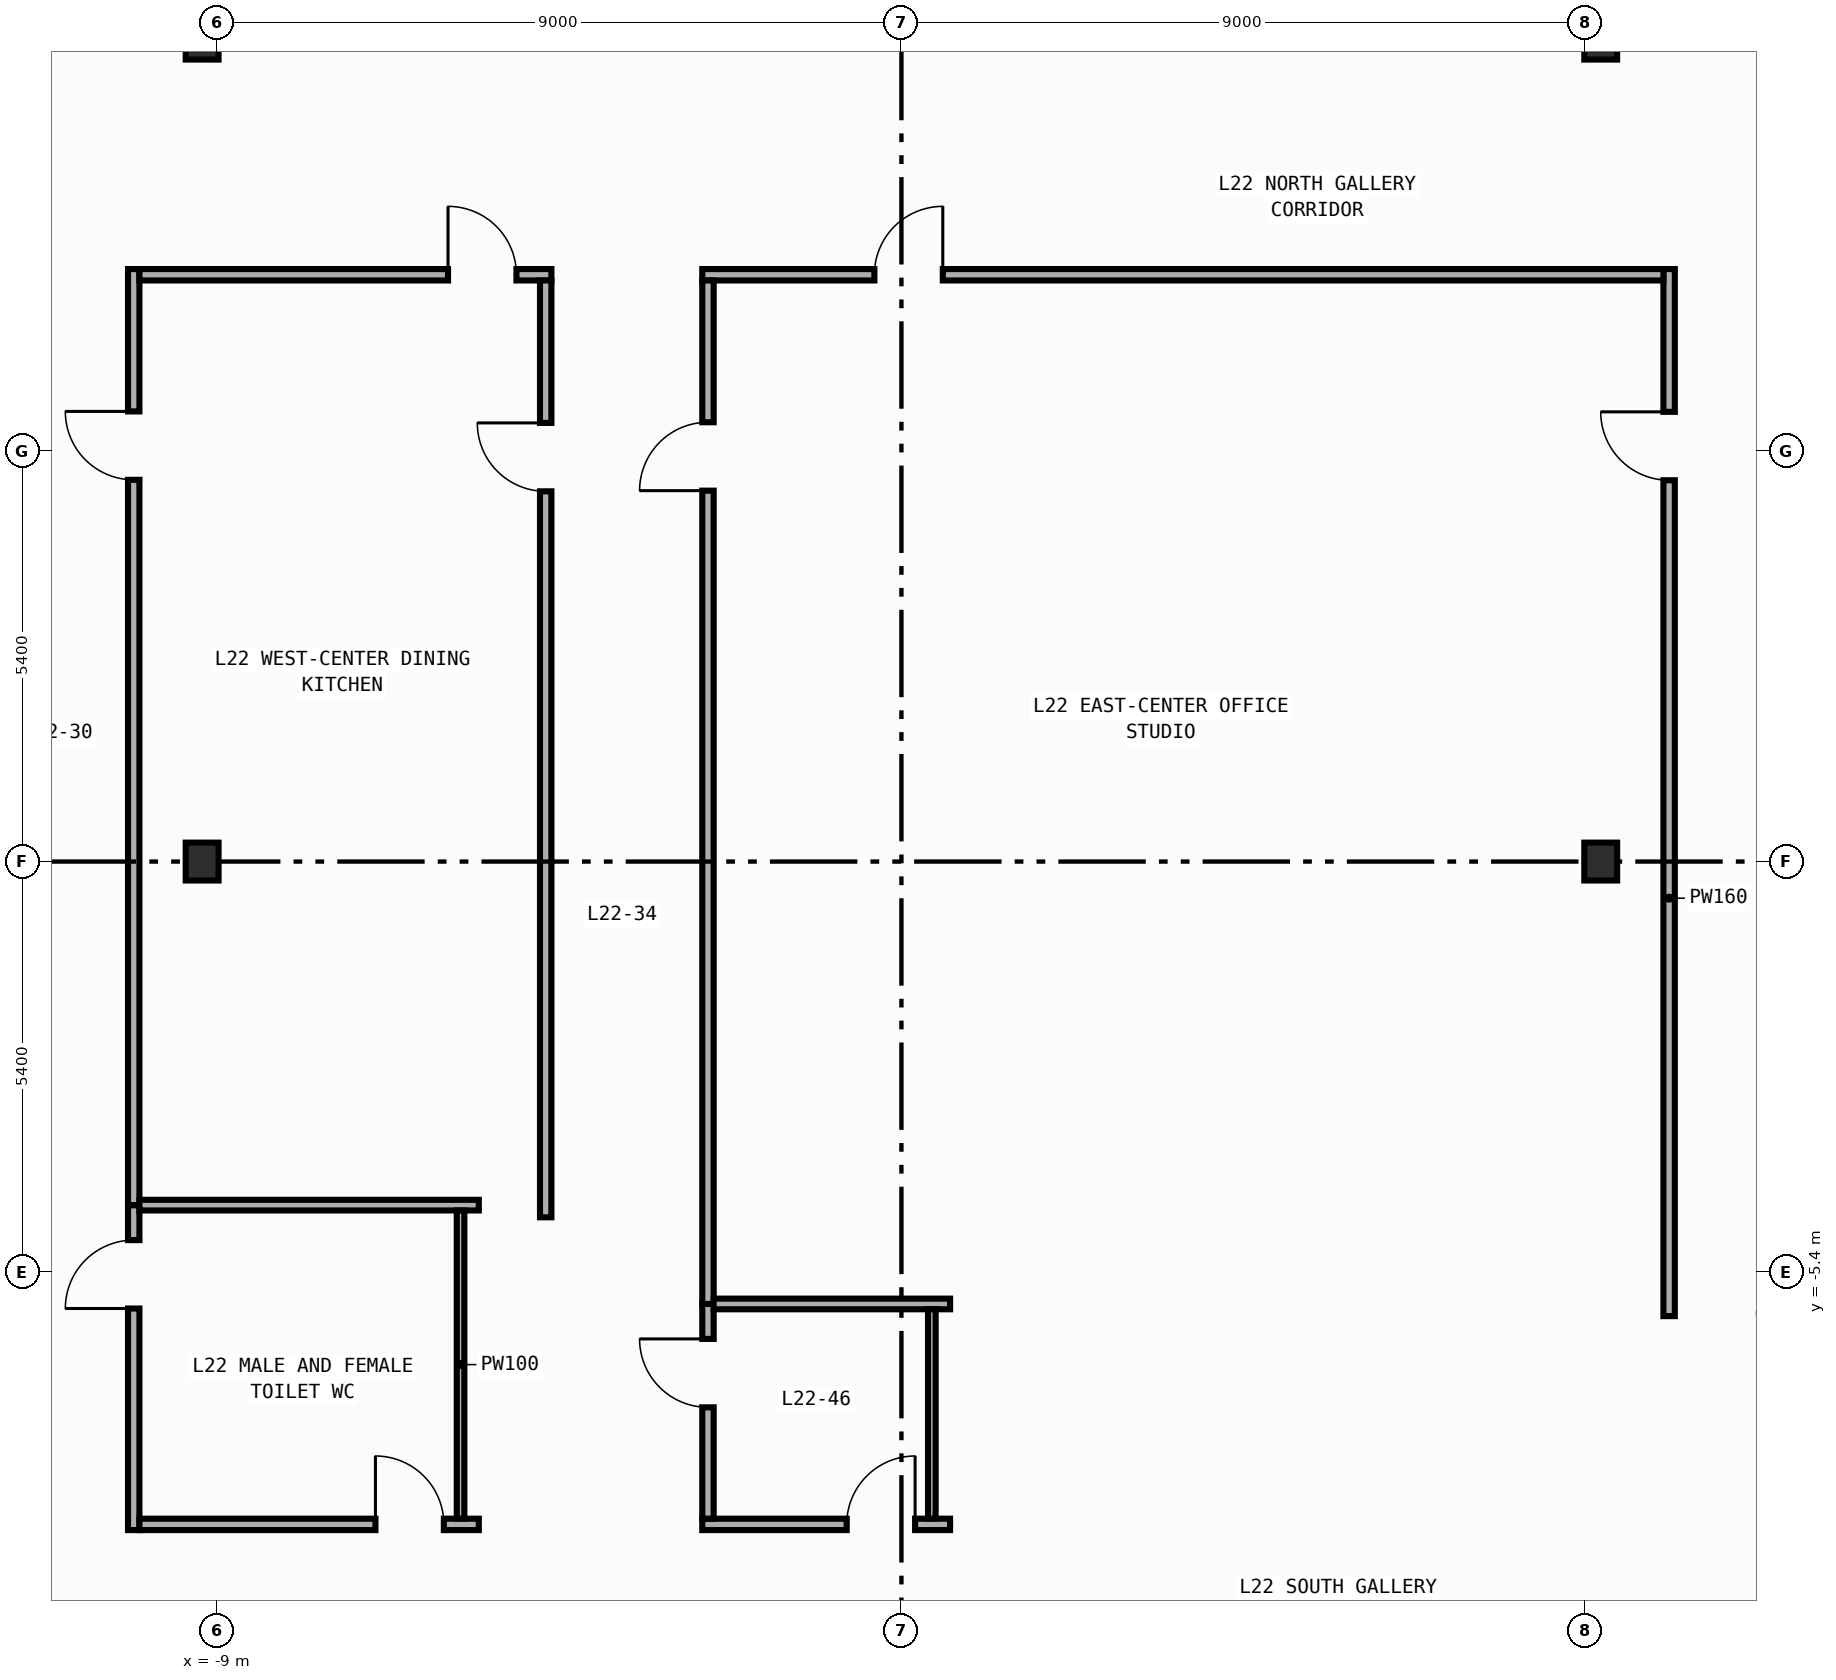
"""IFC4 building model, lengths in metres.
Left out: names, types, materials, properties, quantities, classifications, styles, units other than length and angle.
Written with IfcOpenShell. Run it as: python <this file> out.ifc"""

import sys

from ifc_helpers import new_model, si_unit, direction, frame, frame_2d, origin, origin_2d, place, context, subcontext, project, spatial, rectangle, i_section, extrude, element, fill, save


model = new_model("IFC4")
c1 = context("Model", 3, precision=1e-05, world=origin(), true_north=direction((0.0, 1.0)))
c2 = subcontext(c1, "Body", "Model", "MODEL_VIEW")
j1 = project(units=[si_unit("LENGTHUNIT", "METRE"), si_unit("PLANEANGLEUNIT", "RADIAN")], contexts=[c1])
p1 = place(None, origin())
s1 = spatial("IfcSite", under=j1, at=p1, CompositionType="ELEMENT")
p2 = place(p1, origin())
s2 = spatial("IfcBuilding", under=s1, at=p2, CompositionType="ELEMENT")
p3 = place(p2, frame((0.0, 0.0, 97.4)))
s3 = spatial("IfcBuildingStorey", under=s2, at=p3, CompositionType="ELEMENT", Elevation=97.4)
for number, where, z_axis, x_axis in (
    (1, (-9.2, 0.0, 0.0), (0.0, 0.0, 1.0), (1.0, 0.0, 0.0)),
    (2, (-9.2, 10.8, 0.0), (0.0, 0.0, 1.0), (1.0, 0.0, 0.0)),
    (3, (9.2, 0.0, 0.0), (0.0, 0.0, 1.0), (1.0, 0.0, 0.0)),
    (4, (9.2, 10.8, 0.0), (0.0, 0.0, 1.0), (1.0, 0.0, 0.0)),
):
    element("IfcColumn", number, at=place(p3, frame(where, z_axis=z_axis, x_axis=x_axis)), inside=s3, PredefinedType="COLUMN", context=c2, shape_type="SweptSolid", body=[
        extrude(i_section(OverallWidth=0.432, OverallDepth=0.498, WebThickness=0.045, FlangeThickness=0.07, FilletRadius=0.022, at=origin_2d()), origin(), (0.0, 0.0, 1.0), 4.2),
    ])
p4 = place(p3, frame((-10.1, -8.795, 0.0), z_axis=(0.0, 0.0, 1.0), x_axis=(0.0, 1.0, 0.0)))
e5 = element("IfcWall", 5, at=p4, inside=s3, PredefinedType="PARTITIONING", context=c2, shape_type="SweptSolid", body=[
    extrude(rectangle(XDim=4.275, YDim=0.15, at=frame_2d((2.137, 0.0))), origin(), (0.0, 0.0, 1.0), 3.94),
])
p5 = place(p4, frame((2.915, 0.0, 0.0)))
e6 = element("IfcOpeningElement", 6, at=p5, cuts=e5, PredefinedType="OPENING", context=c2, shape_type="SweptSolid", body=[
    extrude(rectangle(XDim=0.9, YDim=2.15, at=frame_2d((0.45, 1.075))), frame((0.0, 0.085, 0.0), z_axis=(0.0, -1.0, 0.0), x_axis=(1.0, 0.0, 0.0)), (0.0, 0.0, 1.0), 0.17),
])
p6 = place(p3, frame((-10.1, -4.52, 0.0), z_axis=(0.0, 0.0, 1.0), x_axis=(0.0, 1.0, 0.0)))
e7 = element("IfcWall", 7, at=p6, inside=s3, PredefinedType="PARTITIONING", context=c2, shape_type="SweptSolid", body=[
    extrude(rectangle(XDim=12.315, YDim=0.15, at=frame_2d((6.157, 0.0))), origin(), (0.0, 0.0, 1.0), 3.94),
])
p7 = place(p6, frame((9.542, 0.0, 0.0)))
e8 = element("IfcOpeningElement", 8, at=p7, cuts=e7, PredefinedType="OPENING", context=c2, shape_type="SweptSolid", body=[
    extrude(rectangle(XDim=0.9, YDim=2.15, at=frame_2d((0.45, 1.075))), frame((0.0, 0.085, 0.0), z_axis=(0.0, -1.0, 0.0), x_axis=(1.0, 0.0, 0.0)), (0.0, 0.0, 1.0), 0.17),
])
p8 = place(p3, frame((10.1, -5.98, 0.0), z_axis=(0.0, 0.0, 1.0), x_axis=(0.0, 1.0, 0.0)))
e9 = element("IfcWall", 9, at=p8, inside=s3, PredefinedType="PARTITIONING", context=c2, shape_type="SweptSolid", body=[
    extrude(rectangle(XDim=13.775, YDim=0.15, at=frame_2d((6.887, 0.0))), origin(), (0.0, 0.0, 1.0), 3.94),
])
p9 = place(p8, frame((10.997, 0.0, 0.0)))
e10 = element("IfcOpeningElement", 10, at=p9, cuts=e9, PredefinedType="OPENING", context=c2, shape_type="SweptSolid", body=[
    extrude(rectangle(XDim=0.9, YDim=2.15, at=frame_2d((0.45, 1.075))), frame((0.0, 0.085, 0.0), z_axis=(0.0, -1.0, 0.0), x_axis=(1.0, 0.0, 0.0)), (0.0, 0.0, 1.0), 0.17),
])
p10 = place(p3, frame((-2.62, 7.72, 0.0), z_axis=(0.0, 0.0, 1.0), x_axis=(1.0, 0.0, 0.0)))
e11 = element("IfcWall", 11, at=p10, inside=s3, PredefinedType="PARTITIONING", context=c2, shape_type="SweptSolid", body=[
    extrude(rectangle(XDim=12.645, YDim=0.15, at=frame_2d((6.323, 0.0))), origin(), (0.0, 0.0, 1.0), 3.94),
])
p11 = place(p10, frame((2.264, 0.0, 0.0)))
e12 = element("IfcOpeningElement", 12, at=p11, cuts=e11, PredefinedType="OPENING", context=c2, shape_type="SweptSolid", body=[
    extrude(rectangle(XDim=0.9, YDim=2.15, at=frame_2d((0.45, 1.075))), frame((0.0, 0.085, 0.0), z_axis=(0.0, -1.0, 0.0), x_axis=(1.0, 0.0, 0.0)), (0.0, 0.0, 1.0), 0.17),
])
p12 = place(p3, frame((-10.025, 7.72, 0.0), z_axis=(0.0, 0.0, 1.0), x_axis=(1.0, 0.0, 0.0)))
e13 = element("IfcWall", 13, at=p12, inside=s3, PredefinedType="PARTITIONING", context=c2, shape_type="SweptSolid", body=[
    extrude(rectangle(XDim=5.42, YDim=0.15, at=frame_2d((2.71, 0.0))), origin(), (0.0, 0.0, 1.0), 3.94),
])
p13 = place(p12, frame((4.06, 0.0, 0.0)))
e14 = element("IfcOpeningElement", 14, at=p13, cuts=e13, PredefinedType="OPENING", context=c2, shape_type="SweptSolid", body=[
    extrude(rectangle(XDim=0.9, YDim=2.15, at=frame_2d((0.45, 1.075))), frame((0.0, 0.085, 0.0), z_axis=(0.0, -1.0, 0.0), x_axis=(1.0, 0.0, 0.0)), (0.0, 0.0, 1.0), 0.17),
])
p14 = place(p3, frame((-2.62, -8.72, 0.0), z_axis=(0.0, 0.0, 1.0), x_axis=(1.0, 0.0, 0.0)))
e15 = element("IfcWall", 15, at=p14, inside=s3, PredefinedType="PARTITIONING", context=c2, shape_type="SweptSolid", body=[
    extrude(rectangle(XDim=3.26, YDim=0.15, at=frame_2d((1.63, 0.0))), origin(), (0.0, 0.0, 1.0), 3.94),
])
p15 = place(p14, frame((1.9, 0.0, 0.0)))
e16 = element("IfcOpeningElement", 16, at=p15, cuts=e15, PredefinedType="OPENING", context=c2, shape_type="SweptSolid", body=[
    extrude(rectangle(XDim=0.9, YDim=2.15, at=frame_2d((0.45, 1.075))), frame((0.0, 0.085, 0.0), z_axis=(0.0, -1.0, 0.0), x_axis=(1.0, 0.0, 0.0)), (0.0, 0.0, 1.0), 0.17),
])
p16 = place(p3, frame((-10.025, -8.72, 0.0), z_axis=(0.0, 0.0, 1.0), x_axis=(1.0, 0.0, 0.0)))
e17 = element("IfcWall", 17, at=p16, inside=s3, PredefinedType="PARTITIONING", context=c2, shape_type="SweptSolid", body=[
    extrude(rectangle(XDim=4.465, YDim=0.15, at=frame_2d((2.232, 0.0))), origin(), (0.0, 0.0, 1.0), 3.94),
])
p17 = place(p16, frame((3.105, 0.0, 0.0)))
e18 = element("IfcOpeningElement", 18, at=p17, cuts=e17, PredefinedType="OPENING", context=c2, shape_type="SweptSolid", body=[
    extrude(rectangle(XDim=0.9, YDim=2.15, at=frame_2d((0.45, 1.075))), frame((0.0, 0.085, 0.0), z_axis=(0.0, -1.0, 0.0), x_axis=(1.0, 0.0, 0.0)), (0.0, 0.0, 1.0), 0.17),
])
p18 = place(p3, frame((-2.545, -8.645, 0.0), z_axis=(0.0, 0.0, 1.0), x_axis=(0.0, 1.0, 0.0)))
e19 = element("IfcWall", 19, at=p18, inside=s3, PredefinedType="PARTITIONING", context=c2, shape_type="SweptSolid", body=[
    extrude(rectangle(XDim=2.825, YDim=0.15, at=frame_2d((1.413, 0.0))), origin(), (0.0, 0.0, 1.0), 3.94),
])
p19 = place(p18, frame((1.465, 0.0, 0.0)))
e20 = element("IfcOpeningElement", 20, at=p19, cuts=e19, PredefinedType="OPENING", context=c2, shape_type="SweptSolid", body=[
    extrude(rectangle(XDim=0.9, YDim=2.15, at=frame_2d((0.45, 1.075))), frame((0.0, 0.085, 0.0), z_axis=(0.0, -1.0, 0.0), x_axis=(1.0, 0.0, 0.0)), (0.0, 0.0, 1.0), 0.17),
])
p20 = place(p3, frame((-2.545, -5.82, 0.0), z_axis=(0.0, 0.0, 1.0), x_axis=(0.0, 1.0, 0.0)))
e21 = element("IfcWall", 21, at=p20, inside=s3, PredefinedType="PARTITIONING", context=c2, shape_type="SweptSolid", body=[
    extrude(rectangle(XDim=13.465, YDim=0.15, at=frame_2d((6.732, 0.0))), origin(), (0.0, 0.0, 1.0), 3.94),
])
p21 = place(p20, frame((10.7, 0.0, 0.0)))
e22 = element("IfcOpeningElement", 22, at=p21, cuts=e21, PredefinedType="OPENING", context=c2, shape_type="SweptSolid", body=[
    extrude(rectangle(XDim=0.9, YDim=2.15, at=frame_2d((0.45, 1.075))), frame((0.0, 0.085, 0.0), z_axis=(0.0, -1.0, 0.0), x_axis=(1.0, 0.0, 0.0)), (0.0, 0.0, 1.0), 0.17),
])
p22 = place(p3, frame((-4.68, -4.68, 0.0), z_axis=(0.0, 0.0, 1.0), x_axis=(0.0, 1.0, 0.0)))
e23 = element("IfcWall", 23, at=p22, inside=s3, PredefinedType="PARTITIONING", context=c2, shape_type="SweptSolid", body=[
    extrude(rectangle(XDim=12.325, YDim=0.15, at=frame_2d((6.163, 0.0))), origin(), (0.0, 0.0, 1.0), 3.49),
])
p23 = place(p22, frame((9.551, 0.0, 0.0)))
e24 = element("IfcOpeningElement", 24, at=p23, cuts=e23, PredefinedType="OPENING", context=c2, shape_type="SweptSolid", body=[
    extrude(rectangle(XDim=0.9, YDim=2.15, at=frame_2d((0.45, 1.075))), frame((0.0, 0.085, 0.0), z_axis=(0.0, -1.0, 0.0), x_axis=(1.0, 0.0, 0.0)), (0.0, 0.0, 1.0), 0.17),
])
p24 = place(p3, frame((-2.47, -5.82, 0.0), z_axis=(0.0, 0.0, 1.0), x_axis=(1.0, 0.0, 0.0)))
e25 = element("IfcWall", 25, at=p24, inside=s3, PredefinedType="PARTITIONING", context=c2, shape_type="SweptSolid", body=[
    extrude(rectangle(XDim=3.11, YDim=0.14, at=frame_2d((1.555, 0.0))), origin(), (0.0, 0.0, 1.0), 3.94),
])
p25 = place(p3, frame((-10.025, -4.52, 0.0), z_axis=(0.0, 0.0, 1.0), x_axis=(1.0, 0.0, 0.0)))
e26 = element("IfcWall", 26, at=p25, inside=s3, PredefinedType="PARTITIONING", context=c2, shape_type="SweptSolid", body=[
    extrude(rectangle(XDim=4.465, YDim=0.14, at=frame_2d((2.232, 0.0))), origin(), (0.0, 0.0, 1.0), 3.94),
])
p26 = place(p3, frame((0.4, -5.89, 0.0), z_axis=(0.0, 0.0, 1.0), x_axis=(0.0, -1.0, 0.0)))
e27 = element("IfcWall", 27, at=p26, inside=s3, PredefinedType="PARTITIONING", context=c2, shape_type="SweptSolid", body=[
    extrude(rectangle(XDim=2.755, YDim=0.1, at=frame_2d((1.377, 0.0))), origin(), (0.0, 0.0, 1.0), 3.94),
])
p27 = place(p3, frame((-5.8, -4.59, 0.0), z_axis=(0.0, 0.0, 1.0), x_axis=(0.0, -1.0, 0.0)))
e28 = element("IfcWall", 28, at=p27, inside=s3, PredefinedType="PARTITIONING", context=c2, shape_type="SweptSolid", body=[
    extrude(rectangle(XDim=4.055, YDim=0.1, at=frame_2d((2.027, 0.0))), origin(), (0.0, 0.0, 1.0), 3.94),
])
p28 = place(p5, origin())
e29 = element("IfcDoor", 29, at=p28, inside=s3, OperationType="SINGLE_SWING_LEFT", PredefinedType="DOOR", context=c2, shape_type="SweptSolid", body=[
    extrude(rectangle(XDim=0.9, YDim=2.15, at=frame_2d((0.45, 1.075))), frame((0.0, 0.025, 0.0), z_axis=(0.0, -1.0, 0.0), x_axis=(1.0, 0.0, 0.0)), (0.0, 0.0, 1.0), 0.05),
])
fill(e6, e29)
p29 = place(p7, origin())
e30 = element("IfcDoor", 30, at=p29, inside=s3, OperationType="SINGLE_SWING_RIGHT", PredefinedType="DOOR", context=c2, shape_type="SweptSolid", body=[
    extrude(rectangle(XDim=0.9, YDim=2.15, at=frame_2d((0.45, 1.075))), frame((0.0, 0.025, 0.0), z_axis=(0.0, -1.0, 0.0), x_axis=(1.0, 0.0, 0.0)), (0.0, 0.0, 1.0), 0.05),
])
fill(e8, e30)
p30 = place(p9, origin())
e31 = element("IfcDoor", 31, at=p30, inside=s3, OperationType="SINGLE_SWING_RIGHT", PredefinedType="DOOR", context=c2, shape_type="SweptSolid", body=[
    extrude(rectangle(XDim=0.9, YDim=2.15, at=frame_2d((0.45, 1.075))), frame((0.0, 0.025, 0.0), z_axis=(0.0, -1.0, 0.0), x_axis=(1.0, 0.0, 0.0)), (0.0, 0.0, 1.0), 0.05),
])
fill(e10, e31)
p31 = place(p11, origin())
e32 = element("IfcDoor", 32, at=p31, inside=s3, OperationType="SINGLE_SWING_RIGHT", PredefinedType="DOOR", context=c2, shape_type="SweptSolid", body=[
    extrude(rectangle(XDim=0.9, YDim=2.15, at=frame_2d((0.45, 1.075))), frame((0.0, 0.025, 0.0), z_axis=(0.0, -1.0, 0.0), x_axis=(1.0, 0.0, 0.0)), (0.0, 0.0, 1.0), 0.05),
])
fill(e12, e32)
p32 = place(p13, origin())
e33 = element("IfcDoor", 33, at=p32, inside=s3, OperationType="SINGLE_SWING_LEFT", PredefinedType="DOOR", context=c2, shape_type="SweptSolid", body=[
    extrude(rectangle(XDim=0.9, YDim=2.15, at=frame_2d((0.45, 1.075))), frame((0.0, 0.025, 0.0), z_axis=(0.0, -1.0, 0.0), x_axis=(1.0, 0.0, 0.0)), (0.0, 0.0, 1.0), 0.05),
])
fill(e14, e33)
p33 = place(p15, origin())
e34 = element("IfcDoor", 34, at=p33, inside=s3, OperationType="SINGLE_SWING_RIGHT", PredefinedType="DOOR", context=c2, shape_type="SweptSolid", body=[
    extrude(rectangle(XDim=0.9, YDim=2.15, at=frame_2d((0.45, 1.075))), frame((0.0, 0.025, 0.0), z_axis=(0.0, -1.0, 0.0), x_axis=(1.0, 0.0, 0.0)), (0.0, 0.0, 1.0), 0.05),
])
fill(e16, e34)
p34 = place(p17, origin())
e35 = element("IfcDoor", 35, at=p34, inside=s3, OperationType="SINGLE_SWING_LEFT", PredefinedType="DOOR", context=c2, shape_type="SweptSolid", body=[
    extrude(rectangle(XDim=0.9, YDim=2.15, at=frame_2d((0.45, 1.075))), frame((0.0, 0.025, 0.0), z_axis=(0.0, -1.0, 0.0), x_axis=(1.0, 0.0, 0.0)), (0.0, 0.0, 1.0), 0.05),
])
fill(e18, e35)
p35 = place(p19, origin())
e36 = element("IfcDoor", 36, at=p35, inside=s3, OperationType="SINGLE_SWING_RIGHT", PredefinedType="DOOR", context=c2, shape_type="SweptSolid", body=[
    extrude(rectangle(XDim=0.9, YDim=2.15, at=frame_2d((0.45, 1.075))), frame((0.0, 0.025, 0.0), z_axis=(0.0, -1.0, 0.0), x_axis=(1.0, 0.0, 0.0)), (0.0, 0.0, 1.0), 0.05),
])
fill(e20, e36)
p36 = place(p21, origin())
e37 = element("IfcDoor", 37, at=p36, inside=s3, OperationType="SINGLE_SWING_LEFT", PredefinedType="DOOR", context=c2, shape_type="SweptSolid", body=[
    extrude(rectangle(XDim=0.9, YDim=2.15, at=frame_2d((0.45, 1.075))), frame((0.0, 0.025, 0.0), z_axis=(0.0, -1.0, 0.0), x_axis=(1.0, 0.0, 0.0)), (0.0, 0.0, 1.0), 0.05),
])
fill(e22, e37)
p37 = place(p23, origin())
e38 = element("IfcDoor", 38, at=p37, inside=s3, OperationType="SINGLE_SWING_RIGHT", PredefinedType="DOOR", context=c2, shape_type="SweptSolid", body=[
    extrude(rectangle(XDim=0.9, YDim=2.15, at=frame_2d((0.45, 1.075))), frame((0.0, 0.025, 0.0), z_axis=(0.0, -1.0, 0.0), x_axis=(1.0, 0.0, 0.0)), (0.0, 0.0, 1.0), 0.05),
])
fill(e24, e38)
save(model, sys.argv[1])
